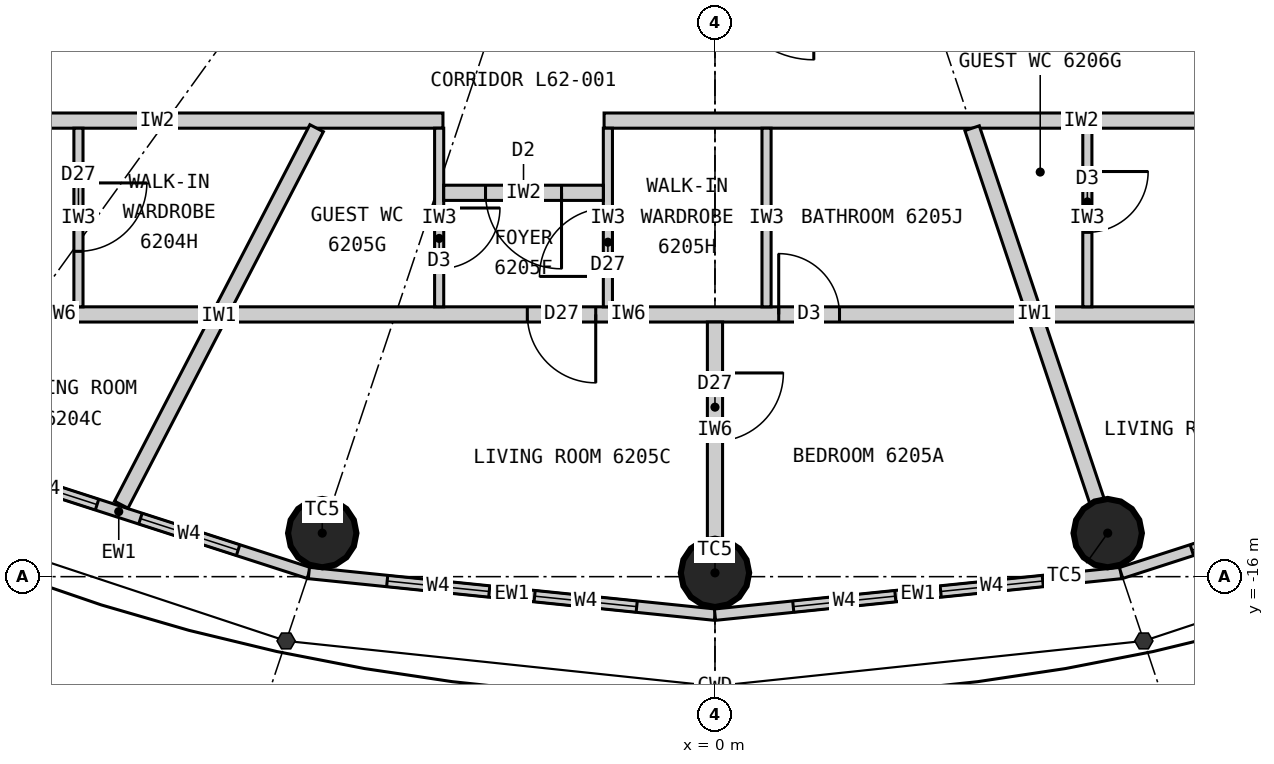
"""IFC4 building model, lengths in metres.
Left out: names, types, materials, properties, quantities, classifications, styles, units other than length and angle.
Written with IfcOpenShell. Run it as: python <this file> out.ifc"""

import sys

from ifc_helpers import new_model, si_unit, direction, frame, frame_2d, origin, origin_2d, place, context, subcontext, project, spatial, rectangle, circle, extrude, clip, halfspace, element, fill, save


model = new_model("IFC4")
c1 = context("Model", 3, precision=1e-05, world=origin(), true_north=direction((0.0, 1.0)))
c2 = subcontext(c1, "Body", "Model", "MODEL_VIEW")
j1 = project(units=[si_unit("LENGTHUNIT", "METRE"), si_unit("PLANEANGLEUNIT", "RADIAN")], contexts=[c1])
p1 = place(None, origin())
s1 = spatial("IfcSite", under=j1, at=p1, CompositionType="ELEMENT")
p2 = place(p1, origin())
s2 = spatial("IfcBuilding", under=s1, at=p2, CompositionType="ELEMENT")
p3 = place(p2, frame((0.0, 0.0, 229.2)))
s3 = spatial("IfcBuildingStorey", under=s2, at=p3, CompositionType="ELEMENT", Elevation=229.2)
for number, where, z_axis, x_axis in (
    (1, (-5.167, -15.427, 0.0), (0.0, 0.0, 1.0), (1.0, 0.0, 0.0)),
    (2, (0.0, -15.95, 0.0), (0.0, 0.0, 1.0), (1.0, 0.0, 0.0)),
    (3, (5.167, -15.427, 0.0), (0.0, 0.0, 1.0), (1.0, 0.0, 0.0)),
):
    element("IfcColumn", number, at=place(p3, frame(where, z_axis=z_axis, x_axis=x_axis)), inside=s3, PredefinedType="COLUMN", context=c2, shape_type="Clipping", body=[
        clip(extrude(circle(Radius=0.45, at=origin_2d()), origin(), (0.0, 0.0, 1.0), 3.3), halfspace(frame((0.0, 0.0, 2.25), z_axis=(0.0, 0.0, 1.0), x_axis=(1.0, 0.0, 0.0)), False)),
    ])
p4 = place(p3, frame((-10.346, -14.336, 0.0), z_axis=(0.0, 0.0, 1.0), x_axis=(0.951644702515, -0.307200846638, 0.0)))
e4 = element("IfcWall", 4, at=p4, inside=s3, PredefinedType="ELEMENTEDWALL", context=c2, shape_type="SweptSolid", body=[
    extrude(rectangle(XDim=5.258, YDim=0.15, at=frame_2d((2.629, 0.0))), origin(), (0.0, 0.0, 1.0), 3.05),
])
p5 = place(p4, frame((0.979, 0.0, 0.9)))
e5 = element("IfcOpeningElement", 5, at=p5, cuts=e4, PredefinedType="OPENING", context=c2, shape_type="SweptSolid", body=[
    extrude(rectangle(XDim=1.35, YDim=1.9, at=frame_2d((0.675, 0.95))), frame((0.0, 0.085, 0.0), z_axis=(0.0, -1.0, 0.0), x_axis=(1.0, 0.0, 0.0)), (0.0, 0.0, 1.0), 0.17),
])
p6 = place(p4, frame((2.929, 0.0, 0.9)))
e6 = element("IfcOpeningElement", 6, at=p6, cuts=e4, PredefinedType="OPENING", context=c2, shape_type="SweptSolid", body=[
    extrude(rectangle(XDim=1.35, YDim=1.9, at=frame_2d((0.675, 0.95))), frame((0.0, 0.085, 0.0), z_axis=(0.0, -1.0, 0.0), x_axis=(1.0, 0.0, 0.0)), (0.0, 0.0, 1.0), 0.17),
])
p7 = place(p3, frame((-5.343, -15.952, 0.0), z_axis=(0.0, 0.0, 1.0), x_axis=(0.994774574972, -0.102095763818, 0.0)))
e7 = element("IfcWall", 7, at=p7, inside=s3, PredefinedType="ELEMENTEDWALL", context=c2, shape_type="SweptSolid", body=[
    extrude(rectangle(XDim=5.371, YDim=0.15, at=frame_2d((2.686, 0.0))), origin(), (0.0, 0.0, 1.0), 3.05),
])
p8 = place(p7, frame((1.035, 0.0, 0.9)))
e8 = element("IfcOpeningElement", 8, at=p8, cuts=e7, PredefinedType="OPENING", context=c2, shape_type="SweptSolid", body=[
    extrude(rectangle(XDim=1.35, YDim=1.9, at=frame_2d((0.675, 0.95))), frame((0.0, 0.085, 0.0), z_axis=(0.0, -1.0, 0.0), x_axis=(1.0, 0.0, 0.0)), (0.0, 0.0, 1.0), 0.17),
])
p9 = place(p7, frame((2.985, 0.0, 0.9)))
e9 = element("IfcOpeningElement", 9, at=p9, cuts=e7, PredefinedType="OPENING", context=c2, shape_type="SweptSolid", body=[
    extrude(rectangle(XDim=1.35, YDim=1.9, at=frame_2d((0.675, 0.95))), frame((0.0, 0.085, 0.0), z_axis=(0.0, -1.0, 0.0), x_axis=(1.0, 0.0, 0.0)), (0.0, 0.0, 1.0), 0.17),
])
p10 = place(p3, frame((0.0, -16.5, 0.0), z_axis=(0.0, 0.0, 1.0), x_axis=(0.994774574972, 0.102095763818, 0.0)))
e10 = element("IfcWall", 10, at=p10, inside=s3, PredefinedType="ELEMENTEDWALL", context=c2, shape_type="SweptSolid", body=[
    extrude(rectangle(XDim=5.371, YDim=0.15, at=frame_2d((2.686, 0.0))), origin(), (0.0, 0.0, 1.0), 3.05),
])
p11 = place(p10, frame((1.035, 0.0, 0.9)))
e11 = element("IfcOpeningElement", 11, at=p11, cuts=e10, PredefinedType="OPENING", context=c2, shape_type="SweptSolid", body=[
    extrude(rectangle(XDim=1.35, YDim=1.9, at=frame_2d((0.675, 0.95))), frame((0.0, 0.085, 0.0), z_axis=(0.0, -1.0, 0.0), x_axis=(1.0, 0.0, 0.0)), (0.0, 0.0, 1.0), 0.17),
])
p12 = place(p10, frame((2.985, 0.0, 0.9)))
e12 = element("IfcOpeningElement", 12, at=p12, cuts=e10, PredefinedType="OPENING", context=c2, shape_type="SweptSolid", body=[
    extrude(rectangle(XDim=1.35, YDim=1.9, at=frame_2d((0.675, 0.95))), frame((0.0, 0.085, 0.0), z_axis=(0.0, -1.0, 0.0), x_axis=(1.0, 0.0, 0.0)), (0.0, 0.0, 1.0), 0.17),
])
p13 = place(p3, frame((5.343, -15.952, 0.0), z_axis=(0.0, 0.0, 1.0), x_axis=(0.951644702515, 0.307200846638, 0.0)))
e13 = element("IfcWall", 13, at=p13, inside=s3, PredefinedType="ELEMENTEDWALL", context=c2, shape_type="SweptSolid", body=[
    extrude(rectangle(XDim=5.258, YDim=0.15, at=frame_2d((2.629, 0.0))), origin(), (0.0, 0.0, 1.0), 3.05),
])
p14 = place(p13, frame((0.979, 0.0, 0.9)))
e14 = element("IfcOpeningElement", 14, at=p14, cuts=e13, PredefinedType="OPENING", context=c2, shape_type="SweptSolid", body=[
    extrude(rectangle(XDim=1.35, YDim=1.9, at=frame_2d((0.675, 0.95))), frame((0.0, 0.085, 0.0), z_axis=(0.0, -1.0, 0.0), x_axis=(1.0, 0.0, 0.0)), (0.0, 0.0, 1.0), 0.17),
])
p15 = place(p13, frame((2.929, 0.0, 0.9)))
e15 = element("IfcOpeningElement", 15, at=p15, cuts=e13, PredefinedType="OPENING", context=c2, shape_type="SweptSolid", body=[
    extrude(rectangle(XDim=1.35, YDim=1.9, at=frame_2d((0.675, 0.95))), frame((0.0, 0.085, 0.0), z_axis=(0.0, -1.0, 0.0), x_axis=(1.0, 0.0, 0.0)), (0.0, 0.0, 1.0), 0.17),
])
p16 = place(p3, frame((11.1, -10.0, 0.0), z_axis=(0.0, 0.0, 1.0), x_axis=(-1.0, 0.0, 0.0)))
e16 = element("IfcWall", 16, at=p16, inside=s3, PredefinedType="PARTITIONING", context=c2, shape_type="SweptSolid", body=[
    extrude(rectangle(XDim=12.559, YDim=0.2, at=frame_2d((6.28, 0.0))), origin(), (0.0, 0.0, 1.0), 3.05),
])
p17 = place(p16, frame((0.691, 0.0, 0.0)))
e17 = element("IfcOpeningElement", 17, at=p17, cuts=e16, PredefinedType="OPENING", context=c2, shape_type="SweptSolid", body=[
    extrude(rectangle(XDim=1.0, YDim=2.2, at=frame_2d((0.5, 1.1))), frame((0.0, 0.11, 0.0), z_axis=(0.0, -1.0, 0.0), x_axis=(1.0, 0.0, 0.0)), (0.0, 0.0, 1.0), 0.22),
])
p18 = place(p3, frame((-3.579, -10.0, 0.0), z_axis=(0.0, 0.0, 1.0), x_axis=(-1.0, 0.0, 0.0)))
e18 = element("IfcWall", 18, at=p18, inside=s3, PredefinedType="PARTITIONING", context=c2, shape_type="SweptSolid", body=[
    extrude(rectangle(XDim=7.521, YDim=0.2, at=frame_2d((3.761, 0.0))), origin(), (0.0, 0.0, 1.0), 3.05),
])
p19 = place(p18, frame((6.206, 0.0, 0.0)))
e19 = element("IfcOpeningElement", 19, at=p19, cuts=e18, PredefinedType="OPENING", context=c2, shape_type="SweptSolid", body=[
    extrude(rectangle(XDim=1.0, YDim=2.2, at=frame_2d((0.5, 1.1))), frame((0.0, 0.11, 0.0), z_axis=(0.0, -1.0, 0.0), x_axis=(1.0, 0.0, 0.0)), (0.0, 0.0, 1.0), 0.22),
])
p20 = place(p3, frame((-5.241, -10.1, 0.0), z_axis=(0.0, 0.0, 1.0), x_axis=(-0.460603196597, -0.887606160008, 0.0)))
e20 = element("IfcWall", 20, at=p20, inside=s3, PredefinedType="PARTITIONING", context=c2, shape_type="SweptSolid", body=[
    extrude(rectangle(XDim=5.58, YDim=0.2, at=frame_2d((2.79, 0.0))), origin(), (0.0, 0.0, 1.0), 3.05),
])
p21 = place(p3, frame((3.383, -10.1, 0.0), z_axis=(0.0, 0.0, 1.0), x_axis=(0.317602151035, -0.948224063003, 0.0)))
e21 = element("IfcWall", 21, at=p21, inside=s3, PredefinedType="PARTITIONING", context=c2, shape_type="SweptSolid", body=[
    extrude(rectangle(XDim=5.168, YDim=0.2, at=frame_2d((2.584, 0.0))), origin(), (0.0, 0.0, 1.0), 2.15),
])
p22 = place(p3, frame((-10.609, -12.55, 0.0), z_axis=(0.0, 0.0, 1.0), x_axis=(1.0, 0.0, 0.0)))
e22 = element("IfcWall", 22, at=p22, inside=s3, PredefinedType="PARTITIONING", context=c2, shape_type="SweptSolid", body=[
    extrude(rectangle(XDim=3.947, YDim=0.2, at=frame_2d((1.974, 0.0))), origin(), (0.0, 0.0, 1.0), 3.05),
])
p23 = place(p3, frame((-8.375, -10.1, 0.0), z_axis=(0.0, 0.0, 1.0), x_axis=(0.0, -1.0, 0.0)))
e23 = element("IfcWall", 23, at=p23, inside=s3, PredefinedType="PARTITIONING", context=c2, shape_type="SweptSolid", body=[
    extrude(rectangle(XDim=2.35, YDim=0.12, at=frame_2d((1.175, 0.0))), origin(), (0.0, 0.0, 1.0), 3.05),
])
p24 = place(p23, frame((0.72, 0.0, 0.0)))
e24 = element("IfcOpeningElement", 24, at=p24, cuts=e23, PredefinedType="OPENING", context=c2, shape_type="SweptSolid", body=[
    extrude(rectangle(XDim=0.9, YDim=2.1, at=frame_2d((0.45, 1.05))), frame((0.0, 0.07, 0.0), z_axis=(0.0, -1.0, 0.0), x_axis=(1.0, 0.0, 0.0)), (0.0, 0.0, 1.0), 0.14),
])
p25 = place(p3, frame((-6.364, -12.55, 0.0), z_axis=(0.0, 0.0, 1.0), x_axis=(1.0, 0.0, 0.0)))
e25 = element("IfcWall", 25, at=p25, inside=s3, PredefinedType="PARTITIONING", context=c2, shape_type="SweptSolid", body=[
    extrude(rectangle(XDim=10.446, YDim=0.2, at=frame_2d((5.223, 0.0))), origin(), (0.0, 0.0, 1.0), 3.05),
])
p26 = place(p25, frame((7.202, 0.0, 0.0)))
e26 = element("IfcOpeningElement", 26, at=p26, cuts=e25, PredefinedType="OPENING", context=c2, shape_type="SweptSolid", body=[
    extrude(rectangle(XDim=0.8, YDim=2.1, at=frame_2d((0.4, 1.05))), frame((0.0, 0.11, 0.0), z_axis=(0.0, -1.0, 0.0), x_axis=(1.0, 0.0, 0.0)), (0.0, 0.0, 1.0), 0.22),
])
p27 = place(p25, frame((3.895, 0.0, 0.0)))
e27 = element("IfcOpeningElement", 27, at=p27, cuts=e25, PredefinedType="OPENING", context=c2, shape_type="SweptSolid", body=[
    extrude(rectangle(XDim=0.9, YDim=2.1, at=frame_2d((0.45, 1.05))), frame((0.0, 0.11, 0.0), z_axis=(0.0, -1.0, 0.0), x_axis=(1.0, 0.0, 0.0)), (0.0, 0.0, 1.0), 0.22),
])
p28 = place(p3, frame((0.0, -12.65, 0.0), z_axis=(0.0, 0.0, 1.0), x_axis=(0.0, -1.0, 0.0)))
e28 = element("IfcWall", 28, at=p28, inside=s3, PredefinedType="PARTITIONING", context=c2, shape_type="SweptSolid", body=[
    extrude(rectangle(XDim=2.85, YDim=0.2, at=frame_2d((1.425, 0.0))), origin(), (0.0, 0.0, 1.0), 2.15),
])
p29 = place(p28, frame((0.67, 0.0, 0.0)))
e29 = element("IfcOpeningElement", 29, at=p29, cuts=e28, PredefinedType="OPENING", context=c2, shape_type="SweptSolid", body=[
    extrude(rectangle(XDim=0.9, YDim=2.1, at=frame_2d((0.45, 1.05))), frame((0.0, 0.11, 0.0), z_axis=(0.0, -1.0, 0.0), x_axis=(1.0, 0.0, 0.0)), (0.0, 0.0, 1.0), 0.22),
])
p30 = place(p3, frame((-3.629, -10.1, 0.0), z_axis=(0.0, 0.0, 1.0), x_axis=(0.0, -1.0, 0.0)))
e30 = element("IfcWall", 30, at=p30, inside=s3, PredefinedType="PARTITIONING", context=c2, shape_type="SweptSolid", body=[
    extrude(rectangle(XDim=2.35, YDim=0.12, at=frame_2d((1.175, 0.0))), origin(), (0.0, 0.0, 1.0), 3.05),
])
p31 = place(p30, frame((1.05, 0.0, 0.0)))
e31 = element("IfcOpeningElement", 31, at=p31, cuts=e30, PredefinedType="OPENING", context=c2, shape_type="SweptSolid", body=[
    extrude(rectangle(XDim=0.8, YDim=2.1, at=frame_2d((0.4, 1.05))), frame((0.0, 0.07, 0.0), z_axis=(0.0, -1.0, 0.0), x_axis=(1.0, 0.0, 0.0)), (0.0, 0.0, 1.0), 0.14),
])
p32 = place(p3, frame((-1.409, -10.1, 0.0), z_axis=(0.0, 0.0, 1.0), x_axis=(0.0, -1.0, 0.0)))
e32 = element("IfcWall", 32, at=p32, inside=s3, PredefinedType="PARTITIONING", context=c2, shape_type="SweptSolid", body=[
    extrude(rectangle(XDim=2.35, YDim=0.12, at=frame_2d((1.175, 0.0))), origin(), (0.0, 0.0, 1.0), 3.05),
])
p33 = place(p32, frame((1.05, 0.0, 0.0)))
e33 = element("IfcOpeningElement", 33, at=p33, cuts=e32, PredefinedType="OPENING", context=c2, shape_type="SweptSolid", body=[
    extrude(rectangle(XDim=0.9, YDim=2.1, at=frame_2d((0.45, 1.05))), frame((0.0, 0.07, 0.0), z_axis=(0.0, -1.0, 0.0), x_axis=(1.0, 0.0, 0.0)), (0.0, 0.0, 1.0), 0.14),
])
p34 = place(p3, frame((0.678, -10.1, 0.0), z_axis=(0.0, 0.0, 1.0), x_axis=(0.0, -1.0, 0.0)))
e34 = element("IfcWall", 34, at=p34, inside=s3, PredefinedType="PARTITIONING", context=c2, shape_type="SweptSolid", body=[
    extrude(rectangle(XDim=2.35, YDim=0.12, at=frame_2d((1.175, 0.0))), origin(), (0.0, 0.0, 1.0), 3.05),
])
p35 = place(p3, frame((-3.569, -10.95, 0.0), z_axis=(0.0, 0.0, 1.0), x_axis=(1.0, 0.0, 0.0)))
e35 = element("IfcWall", 35, at=p35, inside=s3, PredefinedType="PARTITIONING", context=c2, shape_type="SweptSolid", body=[
    extrude(rectangle(XDim=2.1, YDim=0.2, at=frame_2d((1.05, 0.0))), origin(), (0.0, 0.0, 1.0), 3.05),
])
p36 = place(p35, frame((0.55, 0.0, 0.0)))
e36 = element("IfcOpeningElement", 36, at=p36, cuts=e35, PredefinedType="OPENING", context=c2, shape_type="SweptSolid", body=[
    extrude(rectangle(XDim=1.0, YDim=2.2, at=frame_2d((0.5, 1.1))), frame((0.0, 0.11, 0.0), z_axis=(0.0, -1.0, 0.0), x_axis=(1.0, 0.0, 0.0)), (0.0, 0.0, 1.0), 0.22),
])
p37 = place(p3, frame((4.325, -12.55, 0.0), z_axis=(0.0, 0.0, 1.0), x_axis=(1.0, 0.0, 0.0)))
e37 = element("IfcWall", 37, at=p37, inside=s3, PredefinedType="PARTITIONING", context=c2, shape_type="SweptSolid", body=[
    extrude(rectangle(XDim=6.284, YDim=0.2, at=frame_2d((3.142, 0.0))), origin(), (0.0, 0.0, 1.0), 3.05),
])
p38 = place(p37, frame((2.67, 0.0, 0.0)))
e38 = element("IfcOpeningElement", 38, at=p38, cuts=e37, PredefinedType="OPENING", context=c2, shape_type="SweptSolid", body=[
    extrude(rectangle(XDim=0.9, YDim=2.1, at=frame_2d((0.45, 1.05))), frame((0.0, 0.11, 0.0), z_axis=(0.0, -1.0, 0.0), x_axis=(1.0, 0.0, 0.0)), (0.0, 0.0, 1.0), 0.22),
])
p39 = place(p3, frame((4.899, -10.1, 0.0), z_axis=(0.0, 0.0, 1.0), x_axis=(0.0, -1.0, 0.0)))
e39 = element("IfcWall", 39, at=p39, inside=s3, PredefinedType="PARTITIONING", context=c2, shape_type="SweptSolid", body=[
    extrude(rectangle(XDim=2.35, YDim=0.12, at=frame_2d((1.175, 0.0))), origin(), (0.0, 0.0, 1.0), 3.05),
])
p40 = place(p39, frame((0.57, 0.0, 0.0)))
e40 = element("IfcOpeningElement", 40, at=p40, cuts=e39, PredefinedType="OPENING", context=c2, shape_type="SweptSolid", body=[
    extrude(rectangle(XDim=0.8, YDim=2.1, at=frame_2d((0.4, 1.05))), frame((0.0, 0.07, 0.0), z_axis=(0.0, -1.0, 0.0), x_axis=(1.0, 0.0, 0.0)), (0.0, 0.0, 1.0), 0.14),
])
p41 = place(p5, origin())
e41 = element("IfcWindow", 41, at=p41, inside=s3, PartitioningType="SINGLE_PANEL", PredefinedType="WINDOW", context=c2, shape_type="SweptSolid", body=[
    extrude(rectangle(XDim=1.35, YDim=1.9, at=frame_2d((0.675, 0.95))), frame((0.0, 0.03, 0.0), z_axis=(0.0, -1.0, 0.0), x_axis=(1.0, 0.0, 0.0)), (0.0, 0.0, 1.0), 0.06),
])
fill(e5, e41)
p42 = place(p6, origin())
e42 = element("IfcWindow", 42, at=p42, inside=s3, PartitioningType="SINGLE_PANEL", PredefinedType="WINDOW", context=c2, shape_type="SweptSolid", body=[
    extrude(rectangle(XDim=1.35, YDim=1.9, at=frame_2d((0.675, 0.95))), frame((0.0, 0.03, 0.0), z_axis=(0.0, -1.0, 0.0), x_axis=(1.0, 0.0, 0.0)), (0.0, 0.0, 1.0), 0.06),
])
fill(e6, e42)
p43 = place(p8, origin())
e43 = element("IfcWindow", 43, at=p43, inside=s3, PartitioningType="SINGLE_PANEL", PredefinedType="WINDOW", context=c2, shape_type="SweptSolid", body=[
    extrude(rectangle(XDim=1.35, YDim=1.9, at=frame_2d((0.675, 0.95))), frame((0.0, 0.03, 0.0), z_axis=(0.0, -1.0, 0.0), x_axis=(1.0, 0.0, 0.0)), (0.0, 0.0, 1.0), 0.06),
])
fill(e8, e43)
p44 = place(p9, origin())
e44 = element("IfcWindow", 44, at=p44, inside=s3, PartitioningType="SINGLE_PANEL", PredefinedType="WINDOW", context=c2, shape_type="SweptSolid", body=[
    extrude(rectangle(XDim=1.35, YDim=1.9, at=frame_2d((0.675, 0.95))), frame((0.0, 0.03, 0.0), z_axis=(0.0, -1.0, 0.0), x_axis=(1.0, 0.0, 0.0)), (0.0, 0.0, 1.0), 0.06),
])
fill(e9, e44)
p45 = place(p11, origin())
e45 = element("IfcWindow", 45, at=p45, inside=s3, PartitioningType="SINGLE_PANEL", PredefinedType="WINDOW", context=c2, shape_type="SweptSolid", body=[
    extrude(rectangle(XDim=1.35, YDim=1.9, at=frame_2d((0.675, 0.95))), frame((0.0, 0.03, 0.0), z_axis=(0.0, -1.0, 0.0), x_axis=(1.0, 0.0, 0.0)), (0.0, 0.0, 1.0), 0.06),
])
fill(e11, e45)
p46 = place(p12, origin())
e46 = element("IfcWindow", 46, at=p46, inside=s3, PartitioningType="SINGLE_PANEL", PredefinedType="WINDOW", context=c2, shape_type="SweptSolid", body=[
    extrude(rectangle(XDim=1.35, YDim=1.9, at=frame_2d((0.675, 0.95))), frame((0.0, 0.03, 0.0), z_axis=(0.0, -1.0, 0.0), x_axis=(1.0, 0.0, 0.0)), (0.0, 0.0, 1.0), 0.06),
])
fill(e12, e46)
p47 = place(p14, origin())
e47 = element("IfcWindow", 47, at=p47, inside=s3, PartitioningType="SINGLE_PANEL", PredefinedType="WINDOW", context=c2, shape_type="SweptSolid", body=[
    extrude(rectangle(XDim=1.35, YDim=1.9, at=frame_2d((0.675, 0.95))), frame((0.0, 0.03, 0.0), z_axis=(0.0, -1.0, 0.0), x_axis=(1.0, 0.0, 0.0)), (0.0, 0.0, 1.0), 0.06),
])
fill(e14, e47)
p48 = place(p24, origin())
e48 = element("IfcDoor", 48, at=p48, inside=s3, OperationType="SINGLE_SWING_LEFT", PredefinedType="DOOR", context=c2, shape_type="SweptSolid", body=[
    extrude(rectangle(XDim=0.9, YDim=2.1, at=frame_2d((0.45, 1.05))), frame((0.0, 0.025, 0.0), z_axis=(0.0, -1.0, 0.0), x_axis=(1.0, 0.0, 0.0)), (0.0, 0.0, 1.0), 0.05),
])
fill(e24, e48)
p49 = place(p36, origin())
e49 = element("IfcDoor", 49, at=p49, inside=s3, OperationType="SINGLE_SWING_RIGHT", PredefinedType="DOOR", context=c2, shape_type="SweptSolid", body=[
    extrude(rectangle(XDim=1.0, YDim=2.2, at=frame_2d((0.5, 1.1))), frame((0.0, 0.025, 0.0), z_axis=(0.0, -1.0, 0.0), x_axis=(1.0, 0.0, 0.0)), (0.0, 0.0, 1.0), 0.05),
])
fill(e36, e49)
p50 = place(p31, origin())
e50 = element("IfcDoor", 50, at=p50, inside=s3, OperationType="SINGLE_SWING_LEFT", PredefinedType="DOOR", context=c2, shape_type="SweptSolid", body=[
    extrude(rectangle(XDim=0.8, YDim=2.1, at=frame_2d((0.4, 1.05))), frame((0.0, 0.025, 0.0), z_axis=(0.0, -1.0, 0.0), x_axis=(1.0, 0.0, 0.0)), (0.0, 0.0, 1.0), 0.05),
])
fill(e31, e50)
p51 = place(p33, origin())
e51 = element("IfcDoor", 51, at=p51, inside=s3, OperationType="SINGLE_SWING_RIGHT", PredefinedType="DOOR", context=c2, shape_type="SweptSolid", body=[
    extrude(rectangle(XDim=0.9, YDim=2.1, at=frame_2d((0.45, 1.05))), frame((0.0, 0.025, 0.0), z_axis=(0.0, -1.0, 0.0), x_axis=(1.0, 0.0, 0.0)), (0.0, 0.0, 1.0), 0.05),
])
fill(e33, e51)
p52 = place(p26, origin())
e52 = element("IfcDoor", 52, at=p52, inside=s3, OperationType="SINGLE_SWING_LEFT", PredefinedType="DOOR", context=c2, shape_type="SweptSolid", body=[
    extrude(rectangle(XDim=0.8, YDim=2.1, at=frame_2d((0.4, 1.05))), frame((0.0, 0.025, 0.0), z_axis=(0.0, -1.0, 0.0), x_axis=(1.0, 0.0, 0.0)), (0.0, 0.0, 1.0), 0.05),
])
fill(e26, e52)
p53 = place(p27, origin())
e53 = element("IfcDoor", 53, at=p53, inside=s3, OperationType="SINGLE_SWING_RIGHT", PredefinedType="DOOR", context=c2, shape_type="SweptSolid", body=[
    extrude(rectangle(XDim=0.9, YDim=2.1, at=frame_2d((0.45, 1.05))), frame((0.0, 0.025, 0.0), z_axis=(0.0, -1.0, 0.0), x_axis=(1.0, 0.0, 0.0)), (0.0, 0.0, 1.0), 0.05),
])
fill(e27, e53)
p54 = place(p29, origin())
e54 = element("IfcDoor", 54, at=p54, inside=s3, OperationType="SINGLE_SWING_LEFT", PredefinedType="DOOR", context=c2, shape_type="SweptSolid", body=[
    extrude(rectangle(XDim=0.9, YDim=2.1, at=frame_2d((0.45, 1.05))), frame((0.0, 0.025, 0.0), z_axis=(0.0, -1.0, 0.0), x_axis=(1.0, 0.0, 0.0)), (0.0, 0.0, 1.0), 0.05),
])
fill(e29, e54)
p55 = place(p40, origin())
e55 = element("IfcDoor", 55, at=p55, inside=s3, OperationType="SINGLE_SWING_LEFT", PredefinedType="DOOR", context=c2, shape_type="SweptSolid", body=[
    extrude(rectangle(XDim=0.8, YDim=2.1, at=frame_2d((0.4, 1.05))), frame((0.0, 0.025, 0.0), z_axis=(0.0, -1.0, 0.0), x_axis=(1.0, 0.0, 0.0)), (0.0, 0.0, 1.0), 0.05),
])
fill(e40, e55)
save(model, sys.argv[1])
